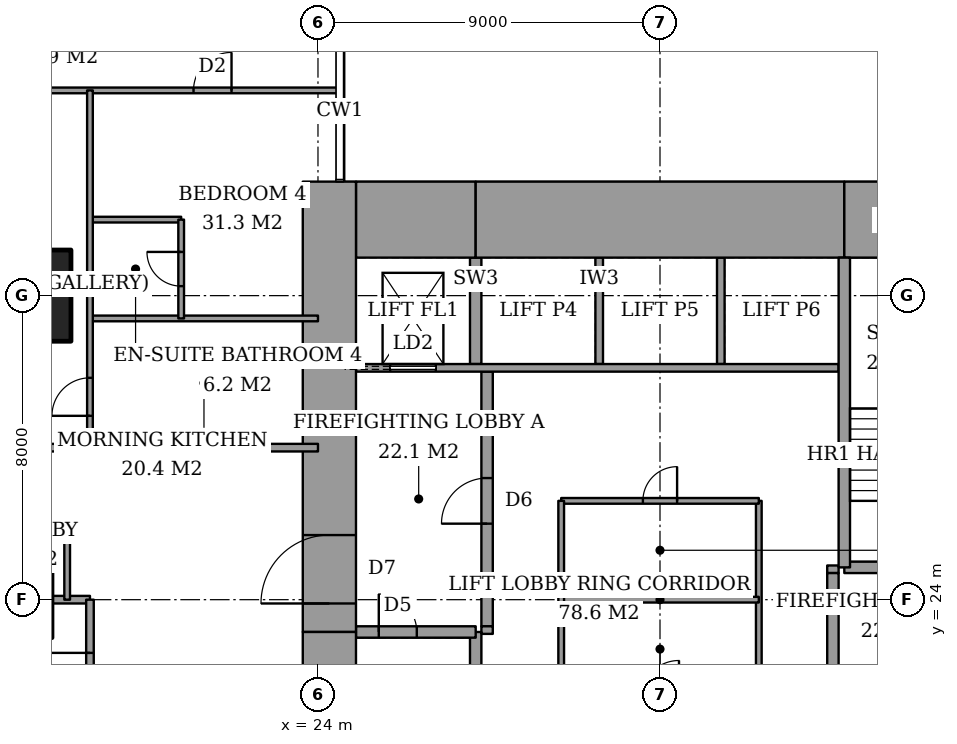
"""IFC4 building model, lengths in metres.
Left out: names, types, materials, properties, quantities, classifications, styles, units other than length and angle.
Written with IfcOpenShell. Run it as: python <this file> out.ifc"""

import sys

from ifc_helpers import new_model, si_unit, direction, frame, frame_2d, origin, origin_2d, place, context, subcontext, project, spatial, rectangle, extrude, element, fill, save


model = new_model("IFC4")
c1 = context("Model", 3, precision=1e-05, world=origin(), true_north=direction((0.0, 1.0)))
c2 = subcontext(c1, "Body", "Model", "MODEL_VIEW")
j1 = project(units=[si_unit("LENGTHUNIT", "METRE"), si_unit("PLANEANGLEUNIT", "RADIAN")], contexts=[c1])
p1 = place(None, origin())
s1 = spatial("IfcSite", under=j1, at=p1, CompositionType="ELEMENT")
p2 = place(p1, origin())
s2 = spatial("IfcBuilding", under=s1, at=p2, CompositionType="ELEMENT")
p3 = place(p2, frame((0.0, 0.0, 117.8)))
s3 = spatial("IfcBuildingStorey", under=s2, at=p3, CompositionType="ELEMENT", Elevation=117.8)
p4 = place(p3, frame((16.0, 32.0, 0.0), z_axis=(0.0, 0.0, 1.0), x_axis=(1.0, 0.0, 0.0)))
e1 = element("IfcColumn", 1, at=p4, inside=s3, PredefinedType="COLUMN", context=c2, shape_type="SweptSolid", body=[
    extrude(rectangle(XDim=3.0, YDim=2.4, at=origin_2d()), origin(), (0.0, 0.0, 1.0), 3.6),
])
p5 = place(p3, frame((25.0, 34.0, 0.0), z_axis=(0.0, 0.0, 1.0), x_axis=(1.0, 0.0, 0.0)))
e2 = element("IfcWall", 2, at=p5, inside=s3, PredefinedType="SHEAR", context=c2, shape_type="SweptSolid", body=[
    extrude(rectangle(XDim=3.15, YDim=2.0, at=frame_2d((1.575, 0.0))), origin(), (0.0, 0.0, 1.0), 3.6),
])
p6 = place(p3, frame((28.15, 34.0, 0.0), z_axis=(0.0, 0.0, 1.0), x_axis=(1.0, 0.0, 0.0)))
e3 = element("IfcWall", 3, at=p6, inside=s3, PredefinedType="SHEAR", context=c2, shape_type="SweptSolid", body=[
    extrude(rectangle(XDim=9.7, YDim=2.0, at=frame_2d((4.85, 0.0))), origin(), (0.0, 0.0, 1.0), 3.6),
])
p7 = place(p3, frame((37.85, 34.0, 0.0), z_axis=(0.0, 0.0, 1.0), x_axis=(1.0, 0.0, 0.0)))
e4 = element("IfcWall", 4, at=p7, inside=s3, PredefinedType="SHEAR", context=c2, shape_type="SweptSolid", body=[
    extrude(rectangle(XDim=3.15, YDim=2.0, at=frame_2d((1.575, 0.0))), origin(), (0.0, 0.0, 1.0), 3.6),
])
p8 = place(p3, frame((24.3, 13.0, 0.0), z_axis=(0.0, 0.0, 1.0), x_axis=(0.0, 1.0, 0.0)))
e5 = element("IfcWall", 5, at=p8, inside=s3, PredefinedType="SHEAR", context=c2, shape_type="SweptSolid", body=[
    extrude(rectangle(XDim=10.15, YDim=1.4, at=frame_2d((5.075, 0.0))), origin(), (0.0, 0.0, 1.0), 3.6),
])
p9 = place(p3, frame((24.3, 23.15, 0.0), z_axis=(0.0, 0.0, 1.0), x_axis=(0.0, 1.0, 0.0)))
e6 = element("IfcWall", 6, at=p9, inside=s3, PredefinedType="SHEAR", context=c2, shape_type="SweptSolid", body=[
    extrude(rectangle(XDim=11.85, YDim=1.4, at=frame_2d((5.925, 0.0))), origin(), (0.0, 0.0, 1.0), 3.6),
])
p10 = place(p9, frame((0.75, 0.0, 0.0)))
e7 = element("IfcOpeningElement", 7, at=p10, cuts=e6, PredefinedType="OPENING", context=c2, shape_type="SweptSolid", body=[
    extrude(rectangle(XDim=1.8, YDim=2.4, at=frame_2d((0.9, 1.2))), frame((0.0, 0.71, 0.0), z_axis=(0.0, -1.0, 0.0), x_axis=(1.0, 0.0, 0.0)), (0.0, 0.0, 1.0), 1.42),
])
p11 = place(p3, frame((28.15, 15.0, 0.0), z_axis=(0.0, 0.0, 1.0), x_axis=(0.0, 1.0, 0.0)))
e8 = element("IfcWall", 8, at=p11, inside=s3, PredefinedType="SHEAR", context=c2, shape_type="SweptSolid", body=[
    extrude(rectangle(XDim=8.15, YDim=0.3, at=frame_2d((4.075, 0.0))), origin(), (0.0, 0.0, 1.0), 3.6),
])
p12 = place(p3, frame((25.0, 23.15, 0.0), z_axis=(0.0, 0.0, 1.0), x_axis=(1.0, 0.0, 0.0)))
e9 = element("IfcWall", 9, at=p12, inside=s3, PredefinedType="SHEAR", context=c2, shape_type="SweptSolid", body=[
    extrude(rectangle(XDim=3.15, YDim=0.3, at=frame_2d((1.575, 0.0))), origin(), (0.0, 0.0, 1.0), 3.6),
])
p13 = place(p12, frame((0.6, 0.0, 0.0)))
e10 = element("IfcOpeningElement", 10, at=p13, cuts=e9, PredefinedType="OPENING", context=c2, shape_type="SweptSolid", body=[
    extrude(rectangle(XDim=1.0, YDim=2.1, at=frame_2d((0.5, 1.05))), frame((0.0, 0.16, 0.0), z_axis=(0.0, -1.0, 0.0), x_axis=(1.0, 0.0, 0.0)), (0.0, 0.0, 1.0), 0.32),
])
p14 = place(p3, frame((37.85, 24.85, 0.0), z_axis=(0.0, 0.0, 1.0), x_axis=(0.0, 1.0, 0.0)))
e11 = element("IfcWall", 11, at=p14, inside=s3, PredefinedType="SHEAR", context=c2, shape_type="SweptSolid", body=[
    extrude(rectangle(XDim=8.15, YDim=0.3, at=frame_2d((4.075, 0.0))), origin(), (0.0, 0.0, 1.0), 3.6),
])
p15 = place(p3, frame((37.85, 24.85, 0.0), z_axis=(0.0, 0.0, 1.0), x_axis=(1.0, 0.0, 0.0)))
e12 = element("IfcWall", 12, at=p15, inside=s3, PredefinedType="SHEAR", context=c2, shape_type="SweptSolid", body=[
    extrude(rectangle(XDim=3.15, YDim=0.3, at=frame_2d((1.575, 0.0))), origin(), (0.0, 0.0, 1.0), 3.6),
])
p16 = place(p15, frame((0.95, 0.0, 0.0)))
e13 = element("IfcOpeningElement", 13, at=p16, cuts=e12, PredefinedType="OPENING", context=c2, shape_type="SweptSolid", body=[
    extrude(rectangle(XDim=1.0, YDim=2.1, at=frame_2d((0.5, 1.05))), frame((0.0, 0.16, 0.0), z_axis=(0.0, -1.0, 0.0), x_axis=(1.0, 0.0, 0.0)), (0.0, 0.0, 1.0), 0.32),
])
p17 = place(p3, frame((28.45, 23.3, 0.0), z_axis=(0.0, 0.0, 1.0), x_axis=(0.0, 1.0, 0.0)))
e14 = element("IfcWall", 14, at=p17, inside=s3, PredefinedType="PARTITIONING", context=c2, shape_type="SweptSolid", body=[
    extrude(rectangle(XDim=6.7, YDim=0.3, at=frame_2d((3.35, 0.0))), origin(), (0.0, 0.0, 1.0), 3.6),
])
p18 = place(p17, frame((2.7, 0.0, 0.0)))
e15 = element("IfcOpeningElement", 15, at=p18, cuts=e14, PredefinedType="OPENING", context=c2, shape_type="SweptSolid", body=[
    extrude(rectangle(XDim=1.2, YDim=2.1, at=frame_2d((0.6, 1.05))), frame((0.0, 0.16, 0.0), z_axis=(0.0, -1.0, 0.0), x_axis=(1.0, 0.0, 0.0)), (0.0, 0.0, 1.0), 0.32),
])
p19 = place(p3, frame((37.55, 18.0, 0.0), z_axis=(0.0, 0.0, 1.0), x_axis=(0.0, 1.0, 0.0)))
e16 = element("IfcWall", 16, at=p19, inside=s3, PredefinedType="PARTITIONING", context=c2, shape_type="SweptSolid", body=[
    extrude(rectangle(XDim=6.7, YDim=0.3, at=frame_2d((3.35, 0.0))), origin(), (0.0, 0.0, 1.0), 3.6),
])
p20 = place(p19, frame((2.8, 0.0, 0.0)))
e17 = element("IfcOpeningElement", 17, at=p20, cuts=e16, PredefinedType="OPENING", context=c2, shape_type="SweptSolid", body=[
    extrude(rectangle(XDim=1.2, YDim=2.1, at=frame_2d((0.6, 1.05))), frame((0.0, 0.16, 0.0), z_axis=(0.0, -1.0, 0.0), x_axis=(1.0, 0.0, 0.0)), (0.0, 0.0, 1.0), 0.32),
])
p21 = place(p3, frame((17.0, 24.0, 0.0), z_axis=(0.0, 0.0, 1.0), x_axis=(1.0, 0.0, 0.0)))
e18 = element("IfcWall", 18, at=p21, inside=s3, PredefinedType="PARTITIONING", context=c2, shape_type="SweptSolid", body=[
    extrude(rectangle(XDim=1.0, YDim=0.2, at=frame_2d((0.5, 0.0))), origin(), (0.0, 0.0, 1.0), 3.35),
])
p22 = place(p3, frame((9.0, 25.6, 0.0), z_axis=(0.0, 0.0, 1.0), x_axis=(1.0, 0.0, 0.0)))
e19 = element("IfcWall", 19, at=p22, inside=s3, PredefinedType="PARTITIONING", context=c2, shape_type="SweptSolid", body=[
    extrude(rectangle(XDim=8.4, YDim=0.15, at=frame_2d((4.2, 0.0))), origin(), (0.0, 0.0, 1.0), 3.35),
])
p23 = place(p22, frame((3.75, 0.0, 0.0)))
e20 = element("IfcOpeningElement", 20, at=p23, cuts=e19, PredefinedType="OPENING", context=c2, shape_type="SweptSolid", body=[
    extrude(rectangle(XDim=0.9, YDim=2.1, at=frame_2d((0.45, 1.05))), frame((0.0, 0.085, 0.0), z_axis=(0.0, -1.0, 0.0), x_axis=(1.0, 0.0, 0.0)), (0.0, 0.0, 1.0), 0.17),
])
p24 = place(p3, frame((6.725, 28.0, 0.0), z_axis=(0.0, 0.0, 1.0), x_axis=(1.0, 0.0, 0.0)))
e21 = element("IfcWall", 21, at=p24, inside=s3, PredefinedType="PARTITIONING", context=c2, shape_type="SweptSolid", body=[
    extrude(rectangle(XDim=17.275, YDim=0.2, at=frame_2d((8.637, 0.0))), origin(), (0.0, 0.0, 1.0), 3.35),
])
p25 = place(p24, frame((6.775, 0.0, 0.0)))
e22 = element("IfcOpeningElement", 22, at=p25, cuts=e21, PredefinedType="OPENING", context=c2, shape_type="SweptSolid", body=[
    extrude(rectangle(XDim=1.2, YDim=2.4, at=frame_2d((0.6, 1.2))), frame((0.0, 0.11, 0.0), z_axis=(0.0, -1.0, 0.0), x_axis=(1.0, 0.0, 0.0)), (0.0, 0.0, 1.0), 0.22),
])
p26 = place(p3, frame((18.0, 31.4, 0.0), z_axis=(0.0, 0.0, 1.0), x_axis=(1.0, 0.0, 0.0)))
e23 = element("IfcWall", 23, at=p26, inside=s3, PredefinedType="PARTITIONING", context=c2, shape_type="SweptSolid", body=[
    extrude(rectangle(XDim=6.0, YDim=0.15, at=frame_2d((3.0, 0.0))), origin(), (0.0, 0.0, 1.0), 3.35),
])
p27 = place(p3, frame((17.5, 32.1, 0.0), z_axis=(0.0, 0.0, 1.0), x_axis=(1.0, 0.0, 0.0)))
e24 = element("IfcWall", 24, at=p27, inside=s3, PredefinedType="PARTITIONING", context=c2, shape_type="SweptSolid", body=[
    extrude(rectangle(XDim=0.5, YDim=0.15, at=frame_2d((0.25, 0.0))), origin(), (0.0, 0.0, 1.0), 2.634),
])
p28 = place(p3, frame((18.0, 34.0, 0.0), z_axis=(0.0, 0.0, 1.0), x_axis=(1.0, 0.0, 0.0)))
e25 = element("IfcWall", 25, at=p28, inside=s3, PredefinedType="PARTITIONING", context=c2, shape_type="SweptSolid", body=[
    extrude(rectangle(XDim=2.4, YDim=0.15, at=frame_2d((1.2, 0.0))), origin(), (0.0, 0.0, 1.0), 3.35),
])
p29 = place(p3, frame((-0.45, 37.4, 0.0), z_axis=(0.0, 0.0, 1.0), x_axis=(1.0, 0.0, 0.0)))
e26 = element("IfcWall", 26, at=p29, inside=s3, PredefinedType="PARTITIONING", context=c2, shape_type="SweptSolid", body=[
    extrude(rectangle(XDim=25.011, YDim=0.15, at=frame_2d((12.505, 0.0))), origin(), (0.0, 0.0, 1.0), 3.35),
])
p30 = place(p29, frame((11.25, 0.0, 0.0)))
e27 = element("IfcOpeningElement", 27, at=p30, cuts=e26, PredefinedType="OPENING", context=c2, shape_type="SweptSolid", body=[
    extrude(rectangle(XDim=1.0, YDim=2.1, at=frame_2d((0.5, 1.05))), frame((0.0, 0.085, 0.0), z_axis=(0.0, -1.0, 0.0), x_axis=(1.0, 0.0, 0.0)), (0.0, 0.0, 1.0), 0.17),
])
p31 = place(p29, frame((3.087, 0.0, 0.0)))
e28 = element("IfcOpeningElement", 28, at=p31, cuts=e26, PredefinedType="OPENING", context=c2, shape_type="SweptSolid", body=[
    extrude(rectangle(XDim=1.0, YDim=2.1, at=frame_2d((0.5, 1.05))), frame((0.0, 0.085, 0.0), z_axis=(0.0, -1.0, 0.0), x_axis=(1.0, 0.0, 0.0)), (0.0, 0.0, 1.0), 0.17),
])
p32 = place(p29, frame((8.462, 0.0, 0.0)))
e29 = element("IfcOpeningElement", 29, at=p32, cuts=e26, PredefinedType="OPENING", context=c2, shape_type="SweptSolid", body=[
    extrude(rectangle(XDim=0.9, YDim=2.1, at=frame_2d((0.45, 1.05))), frame((0.0, 0.085, 0.0), z_axis=(0.0, -1.0, 0.0), x_axis=(1.0, 0.0, 0.0)), (0.0, 0.0, 1.0), 0.17),
])
p33 = place(p29, frame((15.15, 0.0, 0.0)))
e30 = element("IfcOpeningElement", 30, at=p33, cuts=e26, PredefinedType="OPENING", context=c2, shape_type="SweptSolid", body=[
    extrude(rectangle(XDim=1.0, YDim=2.1, at=frame_2d((0.5, 1.05))), frame((0.0, 0.085, 0.0), z_axis=(0.0, -1.0, 0.0), x_axis=(1.0, 0.0, 0.0)), (0.0, 0.0, 1.0), 0.17),
])
p34 = place(p29, frame((21.175, 0.0, 0.0)))
e31 = element("IfcOpeningElement", 31, at=p34, cuts=e26, PredefinedType="OPENING", context=c2, shape_type="SweptSolid", body=[
    extrude(rectangle(XDim=1.0, YDim=2.1, at=frame_2d((0.5, 1.05))), frame((0.0, 0.085, 0.0), z_axis=(0.0, -1.0, 0.0), x_axis=(1.0, 0.0, 0.0)), (0.0, 0.0, 1.0), 0.17),
])
p35 = place(p3, frame((17.4, 24.0, 0.0), z_axis=(0.0, 0.0, 1.0), x_axis=(0.0, 1.0, 0.0)))
e32 = element("IfcWall", 32, at=p35, inside=s3, PredefinedType="PARTITIONING", context=c2, shape_type="SweptSolid", body=[
    extrude(rectangle(XDim=1.6, YDim=0.15, at=frame_2d((0.8, 0.0))), origin(), (0.0, 0.0, 1.0), 3.35),
])
p36 = place(p3, frame((18.0, 17.0, 0.0), z_axis=(0.0, 0.0, 1.0), x_axis=(0.0, 1.0, 0.0)))
e33 = element("IfcWall", 33, at=p36, inside=s3, PredefinedType="PARTITIONING", context=c2, shape_type="SweptSolid", body=[
    extrude(rectangle(XDim=7.0, YDim=0.2, at=frame_2d((3.5, 0.0))), origin(), (0.0, 0.0, 1.0), 3.35),
])
p37 = place(p36, frame((4.4, 0.0, 0.0)))
e34 = element("IfcOpeningElement", 34, at=p37, cuts=e33, PredefinedType="OPENING", context=c2, shape_type="SweptSolid", body=[
    extrude(rectangle(XDim=1.2, YDim=2.4, at=frame_2d((0.6, 1.2))), frame((0.0, 0.11, 0.0), z_axis=(0.0, -1.0, 0.0), x_axis=(1.0, 0.0, 0.0)), (0.0, 0.0, 1.0), 0.22),
])
p38 = place(p36, frame((1.05, 0.0, 0.0)))
e35 = element("IfcOpeningElement", 35, at=p38, cuts=e33, PredefinedType="OPENING", context=c2, shape_type="SweptSolid", body=[
    extrude(rectangle(XDim=0.9, YDim=2.1, at=frame_2d((0.45, 1.05))), frame((0.0, 0.11, 0.0), z_axis=(0.0, -1.0, 0.0), x_axis=(1.0, 0.0, 0.0)), (0.0, 0.0, 1.0), 0.22),
])
p39 = place(p3, frame((18.0, 28.0, 0.0), z_axis=(0.0, 0.0, 1.0), x_axis=(0.0, 1.0, 0.0)))
e36 = element("IfcWall", 36, at=p39, inside=s3, PredefinedType="PARTITIONING", context=c2, shape_type="SweptSolid", body=[
    extrude(rectangle(XDim=9.4, YDim=0.15, at=frame_2d((4.7, 0.0))), origin(), (0.0, 0.0, 1.0), 3.35),
])
p40 = place(p39, frame((0.837, 0.0, 0.0)))
e37 = element("IfcOpeningElement", 37, at=p40, cuts=e36, PredefinedType="OPENING", context=c2, shape_type="SweptSolid", body=[
    extrude(rectangle(XDim=1.0, YDim=2.1, at=frame_2d((0.5, 1.05))), frame((0.0, 0.085, 0.0), z_axis=(0.0, -1.0, 0.0), x_axis=(1.0, 0.0, 0.0)), (0.0, 0.0, 1.0), 0.17),
])
p41 = place(p3, frame((20.4, 31.4, 0.0), z_axis=(0.0, 0.0, 1.0), x_axis=(0.0, 1.0, 0.0)))
e38 = element("IfcWall", 38, at=p41, inside=s3, PredefinedType="PARTITIONING", context=c2, shape_type="SweptSolid", body=[
    extrude(rectangle(XDim=2.6, YDim=0.15, at=frame_2d((1.3, 0.0))), origin(), (0.0, 0.0, 1.0), 3.35),
])
p42 = place(p41, frame((0.85, 0.0, 0.0)))
e39 = element("IfcOpeningElement", 39, at=p42, cuts=e38, PredefinedType="OPENING", context=c2, shape_type="SweptSolid", body=[
    extrude(rectangle(XDim=0.9, YDim=2.1, at=frame_2d((0.45, 1.05))), frame((0.0, 0.085, 0.0), z_axis=(0.0, -1.0, 0.0), x_axis=(1.0, 0.0, 0.0)), (0.0, 0.0, 1.0), 0.17),
])
p43 = place(p3, frame((25.0, 30.1, 0.0), z_axis=(0.0, 0.0, 1.0), x_axis=(1.0, 0.0, 0.0)))
e40 = element("IfcWall", 40, at=p43, inside=s3, PredefinedType="PARTITIONING", context=c2, shape_type="SweptSolid", body=[
    extrude(rectangle(XDim=12.7, YDim=0.2, at=frame_2d((6.35, 0.0))), origin(), (0.0, 0.0, 1.0), 3.6),
])
p44 = place(p43, frame((0.9, 0.0, 0.0)))
e41 = element("IfcOpeningElement", 41, at=p44, cuts=e40, PredefinedType="OPENING", context=c2, shape_type="SweptSolid", body=[
    extrude(rectangle(XDim=1.2, YDim=2.1, at=frame_2d((0.6, 1.05))), frame((0.0, 0.11, 0.0), z_axis=(0.0, -1.0, 0.0), x_axis=(1.0, 0.0, 0.0)), (0.0, 0.0, 1.0), 0.22),
])
for number, where, z_axis, x_axis in (
    (42, (31.4, 30.2, 0.0), (0.0, 0.0, 1.0), (0.0, 1.0, 0.0)),
    (43, (34.6, 30.2, 0.0), (0.0, 0.0, 1.0), (0.0, 1.0, 0.0)),
):
    element("IfcWall", number, at=place(p3, frame(where, z_axis=z_axis, x_axis=x_axis)), inside=s3, PredefinedType="PARTITIONING", context=c2, shape_type="SweptSolid", body=[
        extrude(rectangle(XDim=2.8, YDim=0.2, at=frame_2d((1.4, 0.0))), origin(), (0.0, 0.0, 1.0), 3.6),
    ])
p45 = place(p3, frame((28.15, 30.2, 0.0), z_axis=(0.0, 0.0, 1.0), x_axis=(0.0, 1.0, 0.0)))
e44 = element("IfcWall", 44, at=p45, inside=s3, PredefinedType="SHEAR", context=c2, shape_type="SweptSolid", body=[
    extrude(rectangle(XDim=2.8, YDim=0.3, at=frame_2d((1.4, 0.0))), origin(), (0.0, 0.0, 1.0), 3.6),
])
for number, where, z_axis, x_axis in (
    (45, (28.3, 23.2, 0.0), (0.0, 0.0, 1.0), (1.0, 0.0, 0.0)),
    (46, (37.4, 24.8, 0.0), (0.0, 0.0, 1.0), (1.0, 0.0, 0.0)),
):
    element("IfcWall", number, at=place(p3, frame(where, z_axis=z_axis, x_axis=x_axis)), inside=s3, PredefinedType="PARTITIONING", context=c2, shape_type="SweptSolid", body=[
        extrude(rectangle(XDim=0.3, YDim=0.2, at=frame_2d((0.15, 0.0))), origin(), (0.0, 0.0, 1.0), 3.6),
    ])
p46 = place(p3, frame((30.4, 26.6, 0.0), z_axis=(0.0, 0.0, 1.0), x_axis=(1.0, 0.0, 0.0)))
e47 = element("IfcWall", 47, at=p46, inside=s3, PredefinedType="PARTITIONING", context=c2, shape_type="SweptSolid", body=[
    extrude(rectangle(XDim=5.2, YDim=0.15, at=frame_2d((2.6, 0.0))), origin(), (0.0, 0.0, 1.0), 3.35),
])
p47 = place(p46, frame((2.15, 0.0, 0.0)))
e48 = element("IfcOpeningElement", 48, at=p47, cuts=e47, PredefinedType="OPENING", context=c2, shape_type="SweptSolid", body=[
    extrude(rectangle(XDim=0.9, YDim=2.1, at=frame_2d((0.45, 1.05))), frame((0.0, 0.085, 0.0), z_axis=(0.0, -1.0, 0.0), x_axis=(1.0, 0.0, 0.0)), (0.0, 0.0, 1.0), 0.17),
])
for number, where, z_axis, x_axis in (
    (49, (30.4, 21.4, 0.0), (0.0, 0.0, 1.0), (0.0, 1.0, 0.0)),
    (50, (35.6, 21.4, 0.0), (0.0, 0.0, 1.0), (0.0, 1.0, 0.0)),
    (51, (30.4, 24.0, 0.0), (0.0, 0.0, 1.0), (1.0, 0.0, 0.0)),
):
    element("IfcWall", number, at=place(p3, frame(where, z_axis=z_axis, x_axis=x_axis)), inside=s3, PredefinedType="PARTITIONING", context=c2, shape_type="SweptSolid", body=[
        extrude(rectangle(XDim=5.2, YDim=0.15, at=frame_2d((2.6, 0.0))), origin(), (0.0, 0.0, 1.0), 3.35),
    ])
p48 = place(p37, origin())
e52 = element("IfcDoor", 52, at=p48, inside=s3, OperationType="SINGLE_SWING_LEFT", PredefinedType="DOOR", context=c2, shape_type="SweptSolid", body=[
    extrude(rectangle(XDim=1.2, YDim=2.4, at=frame_2d((0.6, 1.2))), frame((0.0, 0.025, 0.0), z_axis=(0.0, -1.0, 0.0), x_axis=(1.0, 0.0, 0.0)), (0.0, 0.0, 1.0), 0.05),
])
fill(e34, e52)
p49 = place(p42, origin())
e53 = element("IfcDoor", 53, at=p49, inside=s3, OperationType="SINGLE_SWING_LEFT", PredefinedType="DOOR", context=c2, shape_type="SweptSolid", body=[
    extrude(rectangle(XDim=0.9, YDim=2.1, at=frame_2d((0.45, 1.05))), frame((0.0, 0.025, 0.0), z_axis=(0.0, -1.0, 0.0), x_axis=(1.0, 0.0, 0.0)), (0.0, 0.0, 1.0), 0.05),
])
fill(e39, e53)
p50 = place(p34, origin())
e54 = element("IfcDoor", 54, at=p50, inside=s3, OperationType="SINGLE_SWING_LEFT", PredefinedType="DOOR", context=c2, shape_type="SweptSolid", body=[
    extrude(rectangle(XDim=1.0, YDim=2.1, at=frame_2d((0.5, 1.05))), frame((0.0, 0.025, 0.0), z_axis=(0.0, -1.0, 0.0), x_axis=(1.0, 0.0, 0.0)), (0.0, 0.0, 1.0), 0.05),
])
fill(e31, e54)
p51 = place(p40, origin())
e55 = element("IfcDoor", 55, at=p51, inside=s3, OperationType="SINGLE_SWING_RIGHT", PredefinedType="DOOR", context=c2, shape_type="SweptSolid", body=[
    extrude(rectangle(XDim=1.0, YDim=2.1, at=frame_2d((0.5, 1.05))), frame((0.0, 0.025, 0.0), z_axis=(0.0, -1.0, 0.0), x_axis=(1.0, 0.0, 0.0)), (0.0, 0.0, 1.0), 0.05),
])
fill(e37, e55)
p52 = place(p13, origin())
e56 = element("IfcDoor", 56, at=p52, inside=s3, OperationType="SINGLE_SWING_RIGHT", PredefinedType="DOOR", context=c2, shape_type="SweptSolid", body=[
    extrude(rectangle(XDim=1.0, YDim=2.1, at=frame_2d((0.5, 1.05))), frame((0.0, 0.025, 0.0), z_axis=(0.0, -1.0, 0.0), x_axis=(1.0, 0.0, 0.0)), (0.0, 0.0, 1.0), 0.05),
])
fill(e10, e56)
p53 = place(p18, origin())
e57 = element("IfcDoor", 57, at=p53, inside=s3, OperationType="SINGLE_SWING_RIGHT", PredefinedType="DOOR", context=c2, shape_type="SweptSolid", body=[
    extrude(rectangle(XDim=1.2, YDim=2.1, at=frame_2d((0.6, 1.05))), frame((0.0, 0.025, 0.0), z_axis=(0.0, -1.0, 0.0), x_axis=(1.0, 0.0, 0.0)), (0.0, 0.0, 1.0), 0.05),
])
fill(e15, e57)
p54 = place(p10, origin())
e58 = element("IfcDoor", 58, at=p54, inside=s3, OperationType="DOUBLE_DOOR_DOUBLE_SWING", PredefinedType="DOOR", context=c2, shape_type="SweptSolid", body=[
    extrude(rectangle(XDim=1.8, YDim=2.4, at=frame_2d((0.9, 1.2))), frame((0.0, 0.025, 0.0), z_axis=(0.0, -1.0, 0.0), x_axis=(1.0, 0.0, 0.0)), (0.0, 0.0, 1.0), 0.05),
])
fill(e7, e58)
p55 = place(p47, origin())
e59 = element("IfcDoor", 59, at=p55, inside=s3, OperationType="SINGLE_SWING_LEFT", PredefinedType="DOOR", context=c2, shape_type="SweptSolid", body=[
    extrude(rectangle(XDim=0.9, YDim=2.1, at=frame_2d((0.45, 1.05))), frame((0.0, 0.025, 0.0), z_axis=(0.0, -1.0, 0.0), x_axis=(1.0, 0.0, 0.0)), (0.0, 0.0, 1.0), 0.05),
])
fill(e48, e59)
p56 = place(p44, origin())
e60 = element("IfcDoor", 60, at=p56, inside=s3, OperationType="SLIDING_TO_LEFT", PredefinedType="DOOR", context=c2, shape_type="SweptSolid", body=[
    extrude(rectangle(XDim=1.2, YDim=2.1, at=frame_2d((0.6, 1.05))), frame((0.0, 0.025, 0.0), z_axis=(0.0, -1.0, 0.0), x_axis=(1.0, 0.0, 0.0)), (0.0, 0.0, 1.0), 0.05),
])
fill(e41, e60)
save(model, sys.argv[1])
